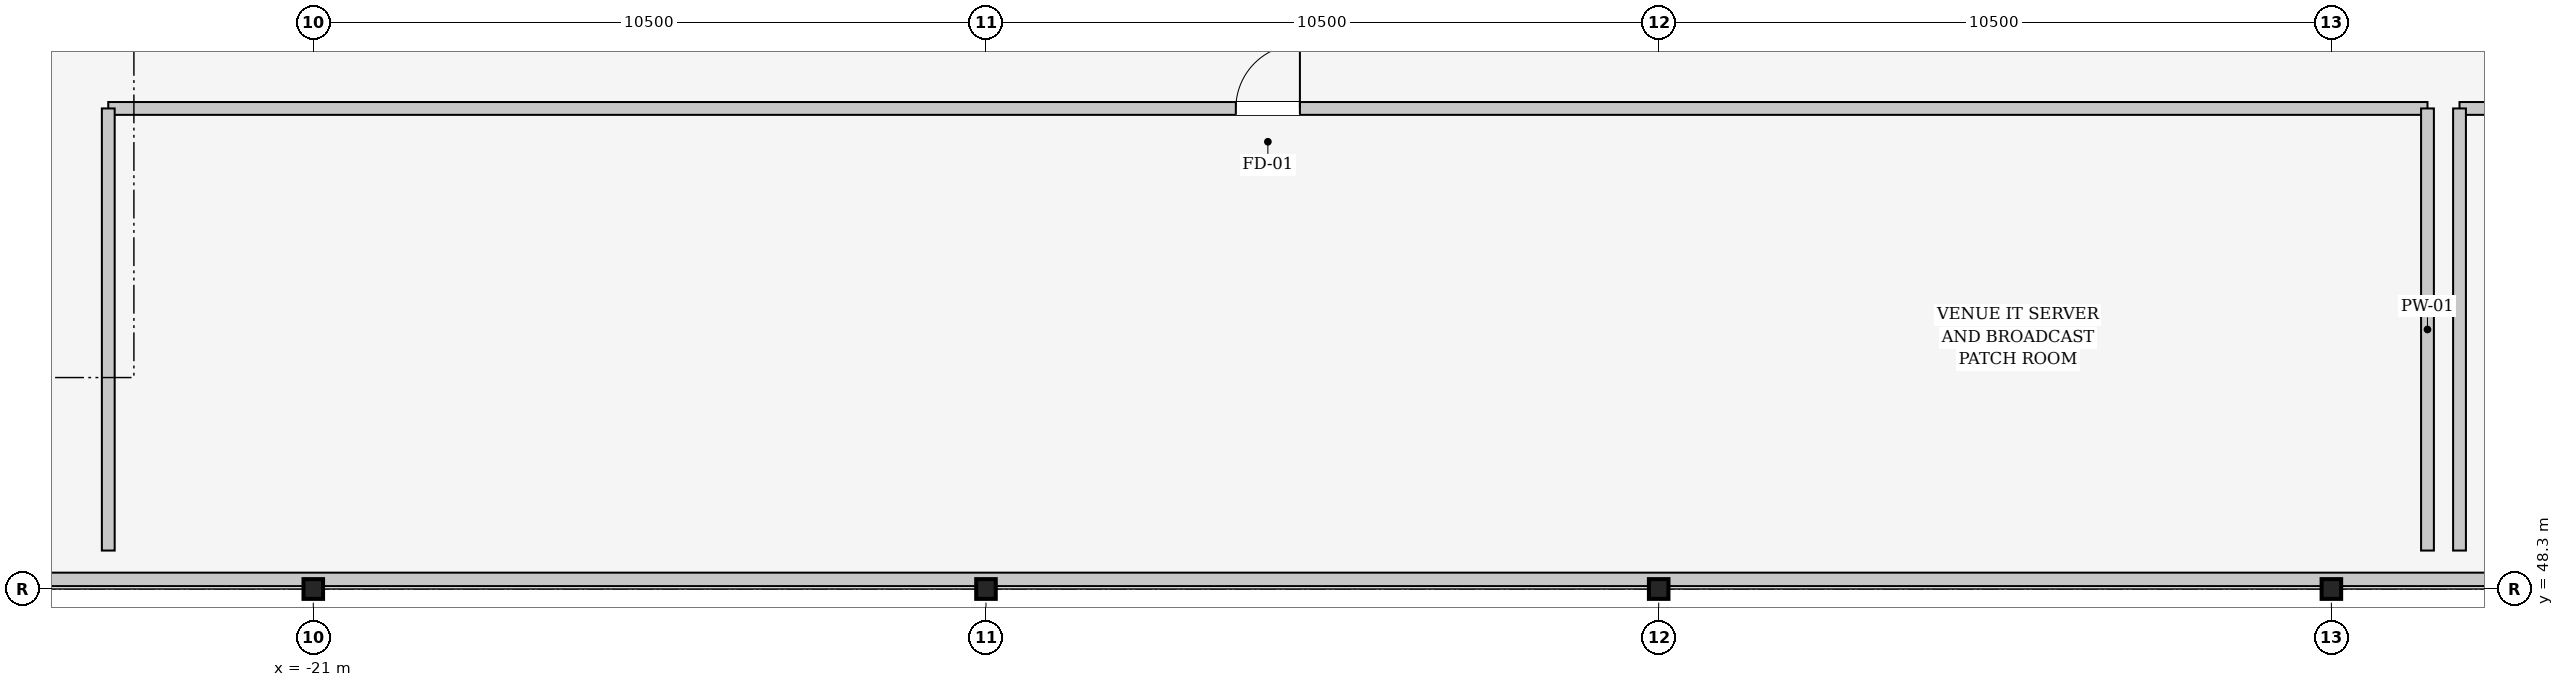
"""IFC4 building model, lengths in metres.
Left out: names, types, materials, properties, quantities, classifications, styles, units other than length and angle.
Written with IfcOpenShell. Run it as: python <this file> out.ifc"""

import sys

from ifc_helpers import new_model, si_unit, direction, frame, frame_2d, origin, origin_2d, place, context, subcontext, project, spatial, rectangle, i_section, extrude, element, fill, save


model = new_model("IFC4")
c1 = context("Model", 3, precision=1e-05, world=origin(), true_north=direction((0.0, 1.0)))
c2 = subcontext(c1, "Body", "Model", "MODEL_VIEW")
j1 = project(units=[si_unit("LENGTHUNIT", "METRE"), si_unit("PLANEANGLEUNIT", "RADIAN")], contexts=[c1])
p1 = place(None, origin())
s1 = spatial("IfcSite", under=j1, at=p1, CompositionType="ELEMENT")
p2 = place(p1, origin())
s2 = spatial("IfcBuilding", under=s1, at=p2, CompositionType="ELEMENT")
p3 = place(p2, frame((0.0, 0.0, 16.2)))
s3 = spatial("IfcBuildingStorey", under=s2, at=p3, CompositionType="ELEMENT", Elevation=16.2)
for number, where, z_axis, x_axis in (
    (1, (-21.0, 48.3, 0.0), (0.0, 0.0, 1.0), (1.0, 0.0, 0.0)),
    (2, (-10.5, 48.3, 0.0), (0.0, 0.0, 1.0), (1.0, 0.0, 0.0)),
    (3, (0.0, 48.3, 0.0), (0.0, 0.0, 1.0), (1.0, 0.0, 0.0)),
    (4, (10.5, 48.3, 0.0), (0.0, 0.0, 1.0), (1.0, 0.0, 0.0)),
):
    element("IfcColumn", number, at=place(p3, frame(where, z_axis=z_axis, x_axis=x_axis)), inside=s3, PredefinedType="COLUMN", context=c2, shape_type="SweptSolid", body=[
        extrude(i_section(OverallWidth=0.305, OverallDepth=0.308, WebThickness=0.01, FlangeThickness=0.015, at=origin_2d()), origin(), (0.0, 0.0, 1.0), 4.8),
    ])
p4 = place(p3, frame((63.95, 48.45, 4.8), z_axis=(0.0, 0.0, 1.0), x_axis=(-1.0, 0.0, 0.0)))
e5 = element("IfcWall", 5, at=p4, inside=s3, PredefinedType="PARAPET", context=c2, shape_type="SweptSolid", body=[
    extrude(rectangle(XDim=100.05, YDim=0.21, at=frame_2d((50.025, 0.0))), origin(), (0.0, 0.0, 1.0), 1.1),
])
p5 = place(p3, frame((-24.2, 55.8, 0.0), z_axis=(0.0, 0.0, 1.0), x_axis=(1.0, 0.0, 0.0)))
e6 = element("IfcWall", 6, at=p5, inside=s3, PredefinedType="PARTITIONING", context=c2, shape_type="SweptSolid", body=[
    extrude(rectangle(XDim=36.2, YDim=0.2, at=frame_2d((18.1, 0.0))), origin(), (0.0, 0.0, 1.0), 3.942),
])
p6 = place(p5, frame((17.6, 0.0, 0.0)))
e7 = element("IfcOpeningElement", 7, at=p6, cuts=e6, PredefinedType="OPENING", context=c2, shape_type="SweptSolid", body=[
    extrude(rectangle(XDim=1.0, YDim=2.15, at=frame_2d((0.5, 1.075))), frame((0.0, 0.11, 0.0), z_axis=(0.0, -1.0, 0.0), x_axis=(1.0, 0.0, 0.0)), (0.0, 0.0, 1.0), 0.22),
])
p7 = place(p3, frame((12.0, 55.8, 0.0), z_axis=(0.0, 0.0, 1.0), x_axis=(0.0, -1.0, 0.0)))
e8 = element("IfcWall", 8, at=p7, inside=s3, PredefinedType="PARTITIONING", context=c2, shape_type="SweptSolid", body=[
    extrude(rectangle(XDim=6.9, YDim=0.2, at=frame_2d((3.45, 0.0))), origin(), (0.0, 0.0, 1.0), 4.162),
])
p8 = place(p3, frame((-24.2, 48.9, 0.0), z_axis=(0.0, 0.0, 1.0), x_axis=(0.0, 1.0, 0.0)))
e9 = element("IfcWall", 9, at=p8, inside=s3, PredefinedType="PARTITIONING", context=c2, shape_type="SweptSolid", body=[
    extrude(rectangle(XDim=6.9, YDim=0.2, at=frame_2d((3.45, 0.0))), origin(), (0.0, 0.0, 1.0), 4.44),
])
p9 = place(p3, frame((12.5, 55.8, 0.0), z_axis=(0.0, 0.0, 1.0), x_axis=(1.0, 0.0, 0.0)))
e10 = element("IfcWall", 10, at=p9, inside=s3, PredefinedType="PARTITIONING", context=c2, shape_type="SweptSolid", body=[
    extrude(rectangle(XDim=13.63, YDim=0.2, at=frame_2d((6.815, 0.0))), origin(), (0.0, 0.0, 1.0), 3.942),
])
p10 = place(p9, frame((6.315, 0.0, 0.0)))
e11 = element("IfcOpeningElement", 11, at=p10, cuts=e10, PredefinedType="OPENING", context=c2, shape_type="SweptSolid", body=[
    extrude(rectangle(XDim=1.0, YDim=2.15, at=frame_2d((0.5, 1.075))), frame((0.0, 0.11, 0.0), z_axis=(0.0, -1.0, 0.0), x_axis=(1.0, 0.0, 0.0)), (0.0, 0.0, 1.0), 0.22),
])
p11 = place(p3, frame((12.5, 48.9, 0.0), z_axis=(0.0, 0.0, 1.0), x_axis=(0.0, 1.0, 0.0)))
e12 = element("IfcWall", 12, at=p11, inside=s3, PredefinedType="PARTITIONING", context=c2, shape_type="SweptSolid", body=[
    extrude(rectangle(XDim=6.9, YDim=0.2, at=frame_2d((3.45, 0.0))), origin(), (0.0, 0.0, 1.0), 4.162),
])
p12 = place(p6, origin())
e13 = element("IfcDoor", 13, at=p12, inside=s3, OperationType="SINGLE_SWING_RIGHT", PredefinedType="DOOR", context=c2, shape_type="SweptSolid", body=[
    extrude(rectangle(XDim=1.0, YDim=2.15, at=frame_2d((0.5, 1.075))), frame((0.0, 0.025, 0.0), z_axis=(0.0, -1.0, 0.0), x_axis=(1.0, 0.0, 0.0)), (0.0, 0.0, 1.0), 0.05),
])
fill(e7, e13)
save(model, sys.argv[1])
